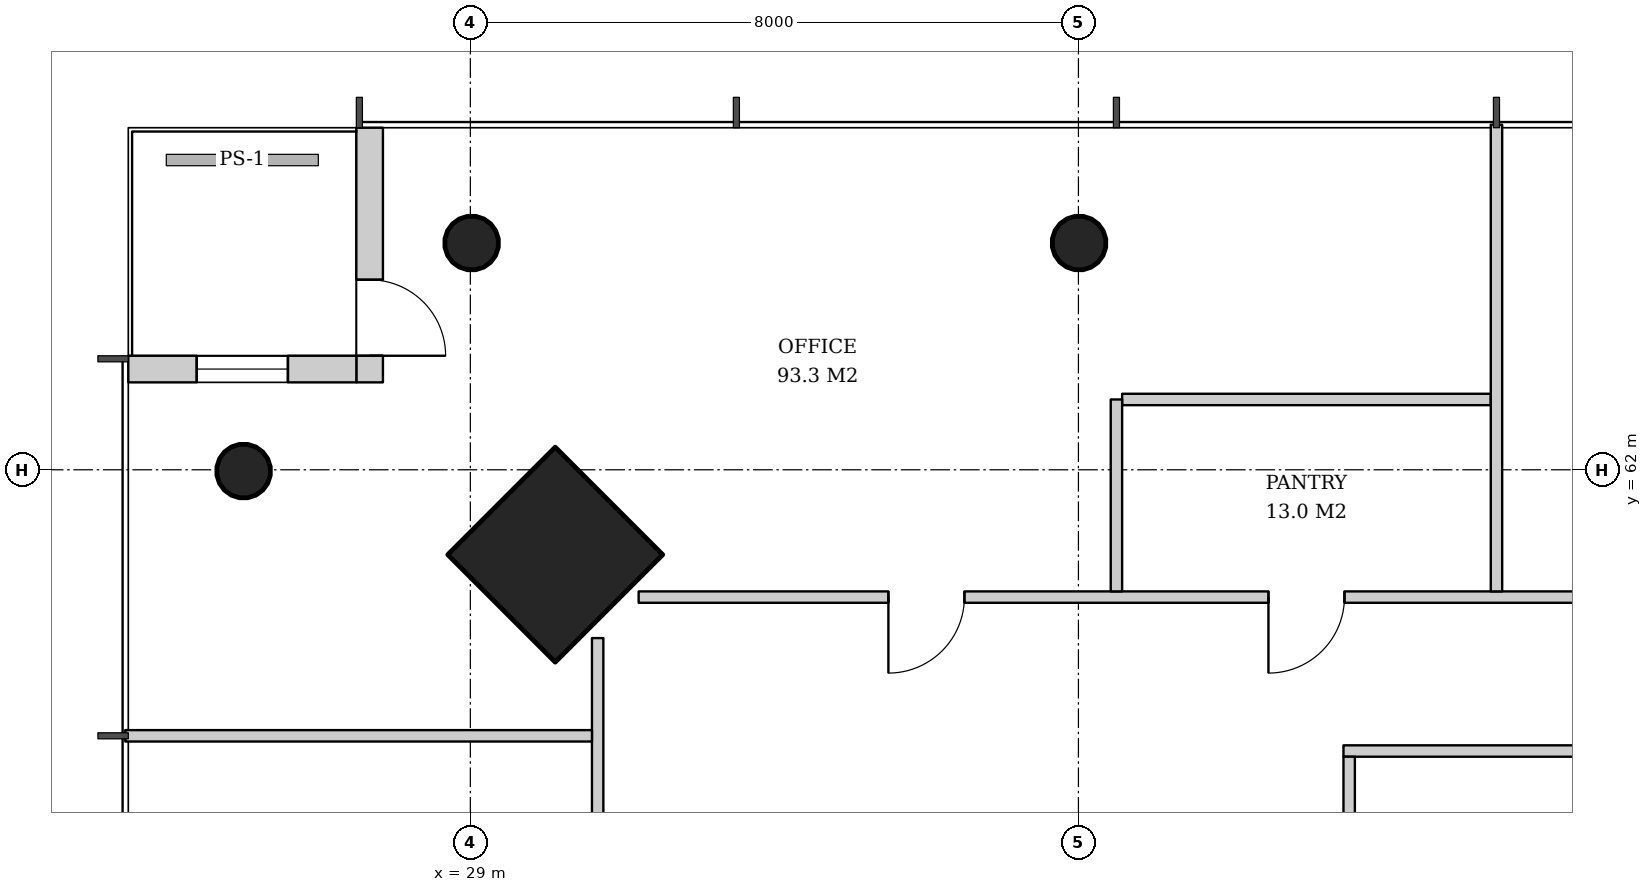
"""IFC4 building model, lengths in metres.
Left out: names, types, materials, properties, quantities, classifications, styles, units other than length and angle.
Written with IfcOpenShell. Run it as: python <this file> out.ifc"""

import sys

from ifc_helpers import new_model, si_unit, direction, frame, frame_2d, origin, origin_2d, place, context, subcontext, project, spatial, rectangle, hollow_circle, extrude, element, fill, save


model = new_model("IFC4")
c1 = context("Model", 3, precision=1e-05, world=origin(), true_north=direction((0.0, 1.0)))
c2 = subcontext(c1, "Body", "Model", "MODEL_VIEW")
j1 = project(units=[si_unit("LENGTHUNIT", "METRE"), si_unit("PLANEANGLEUNIT", "RADIAN")], contexts=[c1])
p1 = place(None, origin())
s1 = spatial("IfcSite", under=j1, at=p1, CompositionType="ELEMENT")
p2 = place(p1, origin())
s2 = spatial("IfcBuilding", under=s1, at=p2, CompositionType="ELEMENT")
p3 = place(p2, frame((0.0, 0.0, 176.8)))
s3 = spatial("IfcBuildingStorey", under=s2, at=p3, CompositionType="ELEMENT", Elevation=176.8)
p4 = place(p3, frame((30.079, 60.921, 0.0), z_axis=(0.031898107953, -0.031898107953, 0.998981992539), x_axis=(0.707106781187, 0.707106781187, 0.0)))
e1 = element("IfcColumn", 1, at=p4, inside=s3, PredefinedType="COLUMN", context=c2, shape_type="SweptSolid", body=[
    extrude(rectangle(XDim=2.0, YDim=2.0, at=origin_2d()), origin(), (0.0, 0.0, 1.0), 3.804),
])
p5 = place(p3, frame((28.979, 65.021, 0.0), z_axis=(0.031962158256, -0.031962158256, 0.998977898093), x_axis=(0.707106781187, 0.707106781187, 0.0)))
e2 = element("IfcColumn", 2, at=p5, inside=s3, PredefinedType="COLUMN", context=c2, shape_type="SweptSolid", body=[
    extrude(hollow_circle(Radius=0.355, WallThickness=0.025, at=origin_2d()), origin(), (0.0, 0.0, 1.0), 3.804),
])
p6 = place(p3, frame((36.989, 65.021, 0.0), z_axis=(0.015987204877, -0.031974409754, 0.999360818924), x_axis=(0.894427191, 0.4472135955, 0.0)))
e3 = element("IfcColumn", 3, at=p6, inside=s3, PredefinedType="COLUMN", context=c2, shape_type="SweptSolid", body=[
    extrude(hollow_circle(Radius=0.355, WallThickness=0.025, at=origin_2d()), origin(), (0.0, 0.0, 1.0), 3.802),
])
p7 = place(p3, frame((25.979, 62.021, 0.0), z_axis=(0.031962158256, -0.031962158256, 0.998977898093), x_axis=(0.707106781187, 0.707106781187, 0.0)))
e4 = element("IfcColumn", 4, at=p7, inside=s3, PredefinedType="COLUMN", context=c2, shape_type="SweptSolid", body=[
    extrude(hollow_circle(Radius=0.355, WallThickness=0.025, at=origin_2d()), origin(), (0.0, 0.0, 1.0), 3.804),
])
p8 = place(p3, frame((27.675, 66.5, 0.0), z_axis=(0.0, 0.0, 1.0), x_axis=(0.0, -1.0, 0.0)))
e5 = element("IfcWall", 5, at=p8, inside=s3, PredefinedType="SOLIDWALL", context=c2, shape_type="SweptSolid", body=[
    extrude(rectangle(XDim=3.35, YDim=0.35, at=frame_2d((1.675, 0.0))), origin(), (0.0, 0.0, 1.0), 3.62),
])
p9 = place(p8, frame((2.0, 0.0, 0.0)))
e6 = element("IfcOpeningElement", 6, at=p9, cuts=e5, PredefinedType="OPENING", context=c2, shape_type="SweptSolid", body=[
    extrude(rectangle(XDim=1.0, YDim=2.4, at=frame_2d((0.5, 1.2))), frame((0.0, 0.185, 0.0), z_axis=(0.0, -1.0, 0.0), x_axis=(1.0, 0.0, 0.0)), (0.0, 0.0, 1.0), 0.37),
])
p10 = place(p3, frame((27.5, 63.325, 0.0), z_axis=(0.0, 0.0, 1.0), x_axis=(-1.0, 0.0, 0.0)))
e7 = element("IfcWall", 7, at=p10, inside=s3, PredefinedType="SOLIDWALL", context=c2, shape_type="SweptSolid", body=[
    extrude(rectangle(XDim=3.0, YDim=0.35, at=frame_2d((1.5, 0.0))), origin(), (0.0, 0.0, 1.0), 3.62),
])
p11 = place(p10, frame((0.9, 0.0, 0.6)))
e8 = element("IfcOpeningElement", 8, at=p11, cuts=e7, PredefinedType="OPENING", context=c2, shape_type="SweptSolid", body=[
    extrude(rectangle(XDim=1.2, YDim=2.55, at=frame_2d((0.6, 1.275))), frame((0.0, 0.185, 0.0), z_axis=(0.0, -1.0, 0.0), x_axis=(1.0, 0.0, 0.0)), (0.0, 0.0, 1.0), 0.37),
])
p12 = place(p3, frame((48.515, 58.3, 0.0), z_axis=(0.0, 0.0, 1.0), x_axis=(-1.0, 0.0, 0.0)))
e9 = element("IfcWall", 9, at=p12, inside=s3, PredefinedType="PARTITIONING", context=c2, shape_type="SweptSolid", body=[
    extrude(rectangle(XDim=8.028, YDim=0.15, at=frame_2d((4.014, 0.0))), origin(), (0.0, 0.0, 1.0), 2.867),
])
p13 = place(p12, frame((3.514, 0.0, 0.0)))
e10 = element("IfcOpeningElement", 10, at=p13, cuts=e9, PredefinedType="OPENING", context=c2, shape_type="SweptSolid", body=[
    extrude(rectangle(XDim=1.0, YDim=2.1, at=frame_2d((0.5, 1.05))), frame((0.0, 0.085, 0.0), z_axis=(0.0, -1.0, 0.0), x_axis=(1.0, 0.0, 0.0)), (0.0, 0.0, 1.0), 0.17),
])
p14 = place(p3, frame((40.562, 55.9, 0.0), z_axis=(0.0, 0.0, 1.0), x_axis=(0.0, 1.0, 0.0)))
e11 = element("IfcWall", 11, at=p14, inside=s3, PredefinedType="PARTITIONING", context=c2, shape_type="SweptSolid", body=[
    extrude(rectangle(XDim=2.325, YDim=0.15, at=frame_2d((1.163, 0.0))), origin(), (0.0, 0.0, 1.0), 3.62),
])
p15 = place(p3, frame((42.425, 62.925, 0.0), z_axis=(0.0, 0.0, 1.0), x_axis=(-1.0, 0.0, 0.0)))
e12 = element("IfcWall", 12, at=p15, inside=s3, PredefinedType="PARTITIONING", context=c2, shape_type="SweptSolid", body=[
    extrude(rectangle(XDim=4.85, YDim=0.15, at=frame_2d((2.425, 0.0))), origin(), (0.0, 0.0, 1.0), 2.867),
])
p16 = place(p3, frame((58.786, 60.325, 0.0), z_axis=(0.0, 0.0, 1.0), x_axis=(-1.0, 0.0, 0.0)))
e13 = element("IfcWall", 13, at=p16, inside=s3, PredefinedType="PARTITIONING", context=c2, shape_type="SweptSolid", body=[
    extrude(rectangle(XDim=27.572, YDim=0.15, at=frame_2d((13.786, 0.0))), origin(), (0.0, 0.0, 1.0), 2.867),
])
p17 = place(p16, frame((3.286, 0.0, 0.0)))
e14 = element("IfcOpeningElement", 14, at=p17, cuts=e13, PredefinedType="OPENING", context=c2, shape_type="SweptSolid", body=[
    extrude(rectangle(XDim=1.0, YDim=2.1, at=frame_2d((0.5, 1.05))), frame((0.0, 0.085, 0.0), z_axis=(0.0, -1.0, 0.0), x_axis=(1.0, 0.0, 0.0)), (0.0, 0.0, 1.0), 0.17),
])
p18 = place(p16, frame((8.286, 0.0, 0.0)))
e15 = element("IfcOpeningElement", 15, at=p18, cuts=e13, PredefinedType="OPENING", context=c2, shape_type="SweptSolid", body=[
    extrude(rectangle(XDim=1.0, YDim=2.1, at=frame_2d((0.5, 1.05))), frame((0.0, 0.085, 0.0), z_axis=(0.0, -1.0, 0.0), x_axis=(1.0, 0.0, 0.0)), (0.0, 0.0, 1.0), 0.17),
])
p19 = place(p16, frame((13.286, 0.0, 0.0)))
e16 = element("IfcOpeningElement", 16, at=p19, cuts=e13, PredefinedType="OPENING", context=c2, shape_type="SweptSolid", body=[
    extrude(rectangle(XDim=1.0, YDim=2.1, at=frame_2d((0.5, 1.05))), frame((0.0, 0.085, 0.0), z_axis=(0.0, -1.0, 0.0), x_axis=(1.0, 0.0, 0.0)), (0.0, 0.0, 1.0), 0.17),
])
p20 = place(p16, frame((18.286, 0.0, 0.0)))
e17 = element("IfcOpeningElement", 17, at=p20, cuts=e13, PredefinedType="OPENING", context=c2, shape_type="SweptSolid", body=[
    extrude(rectangle(XDim=1.0, YDim=2.1, at=frame_2d((0.5, 1.05))), frame((0.0, 0.085, 0.0), z_axis=(0.0, -1.0, 0.0), x_axis=(1.0, 0.0, 0.0)), (0.0, 0.0, 1.0), 0.17),
])
p21 = place(p16, frame((23.286, 0.0, 0.0)))
e18 = element("IfcOpeningElement", 18, at=p21, cuts=e13, PredefinedType="OPENING", context=c2, shape_type="SweptSolid", body=[
    extrude(rectangle(XDim=1.0, YDim=2.1, at=frame_2d((0.5, 1.05))), frame((0.0, 0.085, 0.0), z_axis=(0.0, -1.0, 0.0), x_axis=(1.0, 0.0, 0.0)), (0.0, 0.0, 1.0), 0.17),
])
p22 = place(p3, frame((42.5, 60.4, 0.0), z_axis=(0.0, 0.0, 1.0), x_axis=(0.0, 1.0, 0.0)))
e19 = element("IfcWall", 19, at=p22, inside=s3, PredefinedType="PARTITIONING", context=c2, shape_type="SweptSolid", body=[
    extrude(rectangle(XDim=6.14, YDim=0.15, at=frame_2d((3.07, 0.0))), origin(), (0.0, 0.0, 1.0), 2.867),
])
p23 = place(p3, frame((37.5, 60.4, 0.0), z_axis=(0.0, 0.0, 1.0), x_axis=(0.0, 1.0, 0.0)))
e20 = element("IfcWall", 20, at=p23, inside=s3, PredefinedType="PARTITIONING", context=c2, shape_type="SweptSolid", body=[
    extrude(rectangle(XDim=2.525, YDim=0.15, at=frame_2d((1.263, 0.0))), origin(), (0.0, 0.0, 1.0), 3.62),
])
p24 = place(p3, frame((30.675, 59.786, 0.0), z_axis=(0.0, 0.0, 1.0), x_axis=(0.0, -1.0, 0.0)))
e21 = element("IfcWall", 21, at=p24, inside=s3, PredefinedType="PARTITIONING", context=c2, shape_type="SweptSolid", body=[
    extrude(rectangle(XDim=27.572, YDim=0.15, at=frame_2d((13.786, 0.0))), origin(), (0.0, 0.0, 1.0), 2.867),
])
p25 = place(p24, frame((3.286, 0.0, 0.0)))
e22 = element("IfcOpeningElement", 22, at=p25, cuts=e21, PredefinedType="OPENING", context=c2, shape_type="SweptSolid", body=[
    extrude(rectangle(XDim=1.0, YDim=2.1, at=frame_2d((0.5, 1.05))), frame((0.0, 0.085, 0.0), z_axis=(0.0, -1.0, 0.0), x_axis=(1.0, 0.0, 0.0)), (0.0, 0.0, 1.0), 0.17),
])
p26 = place(p24, frame((8.286, 0.0, 0.0)))
e23 = element("IfcOpeningElement", 23, at=p26, cuts=e21, PredefinedType="OPENING", context=c2, shape_type="SweptSolid", body=[
    extrude(rectangle(XDim=1.0, YDim=2.1, at=frame_2d((0.5, 1.05))), frame((0.0, 0.085, 0.0), z_axis=(0.0, -1.0, 0.0), x_axis=(1.0, 0.0, 0.0)), (0.0, 0.0, 1.0), 0.17),
])
p27 = place(p24, frame((13.386, 0.0, 0.0)))
e24 = element("IfcOpeningElement", 24, at=p27, cuts=e21, PredefinedType="OPENING", context=c2, shape_type="SweptSolid", body=[
    extrude(rectangle(XDim=0.8, YDim=2.1, at=frame_2d((0.4, 1.05))), frame((0.0, 0.085, 0.0), z_axis=(0.0, -1.0, 0.0), x_axis=(1.0, 0.0, 0.0)), (0.0, 0.0, 1.0), 0.17),
])
p28 = place(p24, frame((18.286, 0.0, 0.0)))
e25 = element("IfcOpeningElement", 25, at=p28, cuts=e21, PredefinedType="OPENING", context=c2, shape_type="SweptSolid", body=[
    extrude(rectangle(XDim=1.0, YDim=2.1, at=frame_2d((0.5, 1.05))), frame((0.0, 0.085, 0.0), z_axis=(0.0, -1.0, 0.0), x_axis=(1.0, 0.0, 0.0)), (0.0, 0.0, 1.0), 0.17),
])
p29 = place(p24, frame((23.386, 0.0, 0.0)))
e26 = element("IfcOpeningElement", 26, at=p29, cuts=e21, PredefinedType="OPENING", context=c2, shape_type="SweptSolid", body=[
    extrude(rectangle(XDim=0.8, YDim=2.1, at=frame_2d((0.4, 1.05))), frame((0.0, 0.085, 0.0), z_axis=(0.0, -1.0, 0.0), x_axis=(1.0, 0.0, 0.0)), (0.0, 0.0, 1.0), 0.17),
])
p30 = place(p3, frame((30.6, 58.5, 0.0), z_axis=(0.0, 0.0, 1.0), x_axis=(-1.0, 0.0, 0.0)))
e27 = element("IfcWall", 27, at=p30, inside=s3, PredefinedType="PARTITIONING", context=c2, shape_type="SweptSolid", body=[
    extrude(rectangle(XDim=6.14, YDim=0.15, at=frame_2d((3.07, 0.0))), origin(), (0.0, 0.0, 1.0), 3.12),
])
p31 = place(p9, origin())
e28 = element("IfcDoor", 28, at=p31, inside=s3, OperationType="SINGLE_SWING_RIGHT", PredefinedType="DOOR", context=c2, shape_type="SweptSolid", body=[
    extrude(rectangle(XDim=1.0, YDim=2.4, at=frame_2d((0.5, 1.2))), frame((0.0, 0.025, 0.0), z_axis=(0.0, -1.0, 0.0), x_axis=(1.0, 0.0, 0.0)), (0.0, 0.0, 1.0), 0.05),
])
fill(e6, e28)
p32 = place(p11, origin())
e29 = element("IfcWindow", 29, at=p32, inside=s3, PartitioningType="SINGLE_PANEL", PredefinedType="WINDOW", context=c2, shape_type="SweptSolid", body=[
    extrude(rectangle(XDim=1.2, YDim=2.55, at=frame_2d((0.6, 1.275))), frame((0.0, 0.03, 0.0), z_axis=(0.0, -1.0, 0.0), x_axis=(1.0, 0.0, 0.0)), (0.0, 0.0, 1.0), 0.06),
])
fill(e8, e29)
p33 = place(p20, origin())
e30 = element("IfcDoor", 30, at=p33, inside=s3, OperationType="SINGLE_SWING_RIGHT", PredefinedType="DOOR", context=c2, shape_type="SweptSolid", body=[
    extrude(rectangle(XDim=1.0, YDim=2.1, at=frame_2d((0.5, 1.05))), frame((0.0, 0.025, 0.0), z_axis=(0.0, -1.0, 0.0), x_axis=(1.0, 0.0, 0.0)), (0.0, 0.0, 1.0), 0.05),
])
fill(e17, e30)
p34 = place(p21, origin())
e31 = element("IfcDoor", 31, at=p34, inside=s3, OperationType="SINGLE_SWING_RIGHT", PredefinedType="DOOR", context=c2, shape_type="SweptSolid", body=[
    extrude(rectangle(XDim=1.0, YDim=2.1, at=frame_2d((0.5, 1.05))), frame((0.0, 0.025, 0.0), z_axis=(0.0, -1.0, 0.0), x_axis=(1.0, 0.0, 0.0)), (0.0, 0.0, 1.0), 0.05),
])
fill(e18, e31)
save(model, sys.argv[1])
